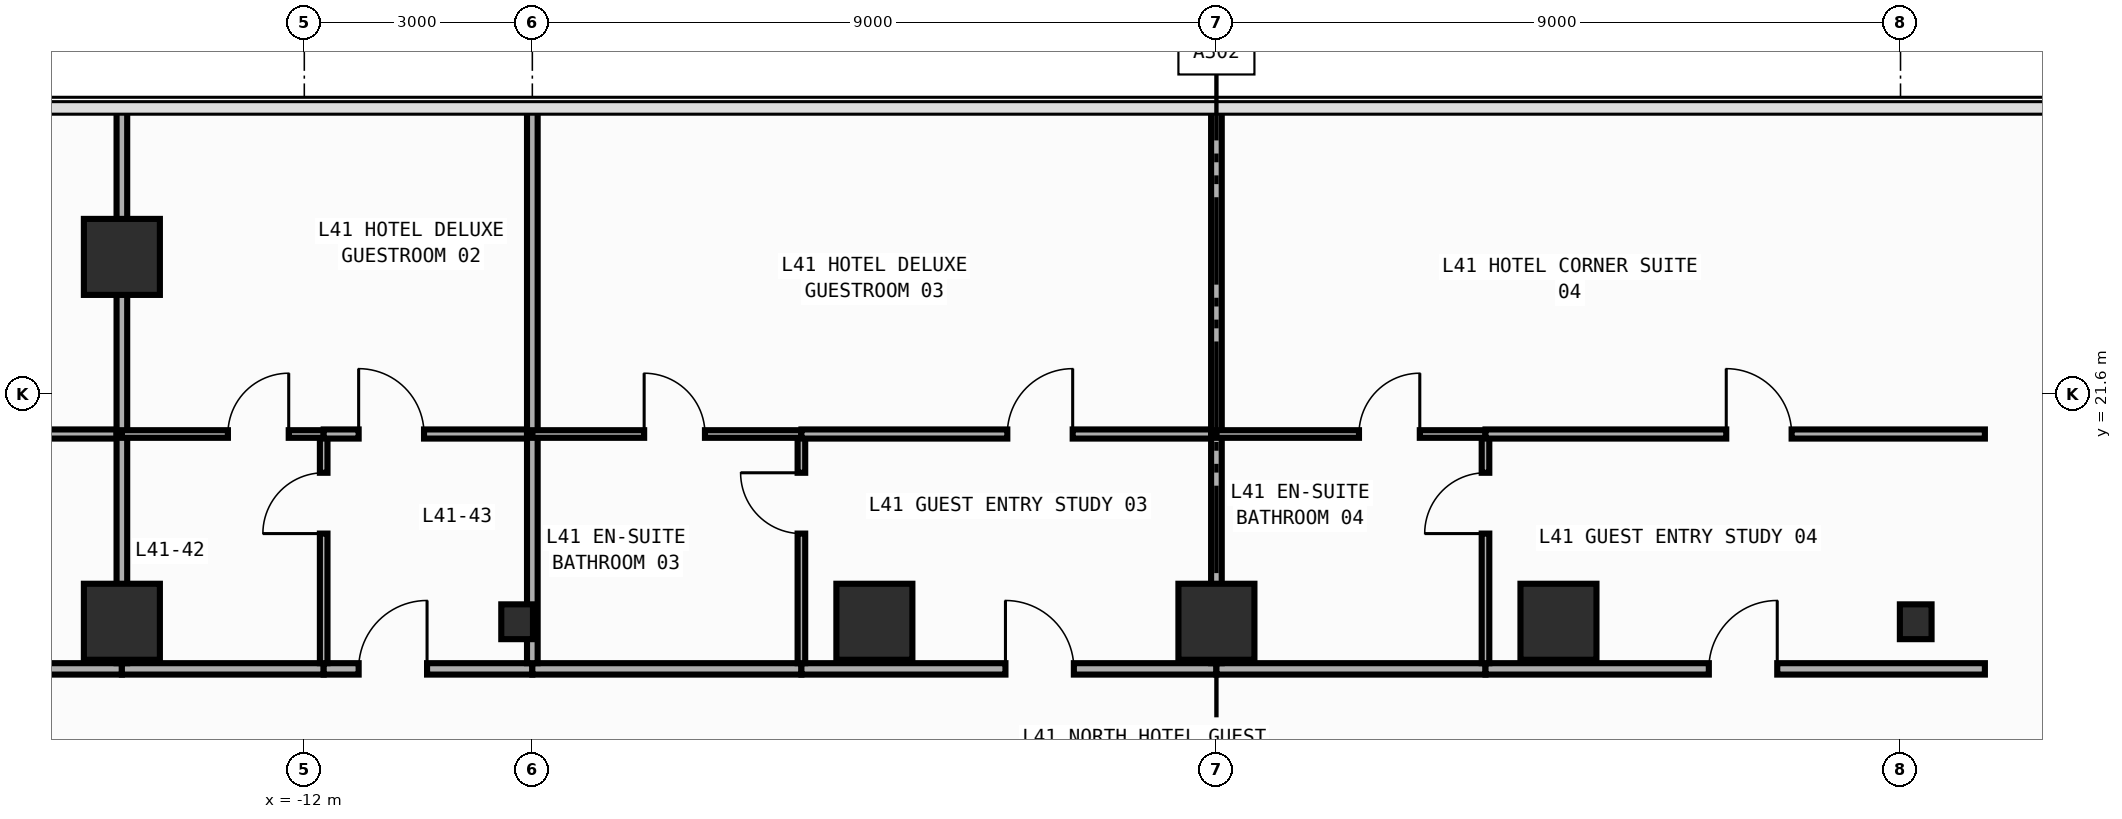
"""IFC4 building model, lengths in metres.
Left out: names, types, materials, properties, quantities, classifications, styles, units other than length and angle.
Written with IfcOpenShell. Run it as: python <this file> out.ifc"""

import sys

from ifc_helpers import new_model, si_unit, direction, frame, frame_2d, origin, origin_2d, place, context, subcontext, project, spatial, rectangle, i_section, extrude, element, fill, save


model = new_model("IFC4")
c1 = context("Model", 3, precision=1e-05, world=origin(), true_north=direction((0.0, 1.0)))
c2 = subcontext(c1, "Body", "Model", "MODEL_VIEW")
j1 = project(units=[si_unit("LENGTHUNIT", "METRE"), si_unit("PLANEANGLEUNIT", "RADIAN")], contexts=[c1])
p1 = place(None, origin())
s1 = spatial("IfcSite", under=j1, at=p1, CompositionType="ELEMENT")
p2 = place(p1, origin())
s2 = spatial("IfcBuilding", under=s1, at=p2, CompositionType="ELEMENT")
p3 = place(p2, frame((0.0, 0.0, 180.2)))
s3 = spatial("IfcBuildingStorey", under=s2, at=p3, CompositionType="ELEMENT", Elevation=180.2)
for number, where, z_axis, x_axis in (
    (1, (-9.2, 18.6, 0.0), (0.0, 0.0, 1.0), (1.0, 0.0, 0.0)),
    (2, (9.2, 18.6, 0.0), (0.0, 0.0, 1.0), (1.0, 0.0, 0.0)),
):
    element("IfcColumn", number, at=place(p3, frame(where, z_axis=z_axis, x_axis=x_axis)), inside=s3, PredefinedType="COLUMN", context=c2, shape_type="SweptSolid", body=[
        extrude(i_section(OverallWidth=0.417, OverallDepth=0.458, WebThickness=0.03, FlangeThickness=0.05, FilletRadius=0.022, at=origin_2d()), origin(), (0.0, 0.0, 1.0), 3.8),
    ])
for number, where, z_axis, x_axis in (
    (3, (-14.4, 18.6, 0.0), (0.0, 0.0, 1.0), (1.0, 0.0, 0.0)),
    (4, (-4.5, 18.6, 0.0), (0.0, 0.0, 1.0), (1.0, 0.0, 0.0)),
    (5, (0.0, 18.6, 0.0), (0.0, 0.0, 1.0), (1.0, 0.0, 0.0)),
    (6, (4.5, 18.6, 0.0), (0.0, 0.0, 1.0), (1.0, 0.0, 0.0)),
    (7, (-14.4, 23.4, 0.0), (0.0, 0.0, 1.0), (1.0, 0.0, 0.0)),
):
    element("IfcColumn", number, at=place(p3, frame(where, z_axis=z_axis, x_axis=x_axis)), inside=s3, PredefinedType="COLUMN", context=c2, shape_type="SweptSolid", body=[
        extrude(rectangle(XDim=1.0, YDim=1.0, at=origin_2d()), origin(), (0.0, 0.0, 1.0), 3.8),
    ])
p4 = place(p3, frame((-18.764, 17.98, 0.0), z_axis=(0.0, 0.0, 1.0), x_axis=(1.0, 0.0, 0.0)))
e8 = element("IfcWall", 8, at=p4, inside=s3, PredefinedType="PARTITIONING", context=c2, shape_type="SweptSolid", body=[
    extrude(rectangle(XDim=4.364, YDim=0.15, at=frame_2d((2.182, 0.0))), origin(), (0.0, 0.0, 1.0), 3.54),
])
p5 = place(p4, frame((0.884, 0.0, 0.0)))
e9 = element("IfcOpeningElement", 9, at=p5, cuts=e8, PredefinedType="OPENING", context=c2, shape_type="SweptSolid", body=[
    extrude(rectangle(XDim=0.9, YDim=2.15, at=frame_2d((0.45, 1.075))), frame((0.0, 0.085, 0.0), z_axis=(0.0, -1.0, 0.0), x_axis=(1.0, 0.0, 0.0)), (0.0, 0.0, 1.0), 0.17),
])
p6 = place(p3, frame((-14.4, 17.98, 0.0), z_axis=(0.0, 0.0, 1.0), x_axis=(1.0, 0.0, 0.0)))
e10 = element("IfcWall", 10, at=p6, inside=s3, PredefinedType="PARTITIONING", context=c2, shape_type="SweptSolid", body=[
    extrude(rectangle(XDim=2.655, YDim=0.15, at=frame_2d((1.327, 0.0))), origin(), (0.0, 0.0, 1.0), 3.54),
])
p7 = place(p3, frame((-11.745, 17.98, 0.0), z_axis=(0.0, 0.0, 1.0), x_axis=(1.0, 0.0, 0.0)))
e11 = element("IfcWall", 11, at=p7, inside=s3, PredefinedType="PARTITIONING", context=c2, shape_type="SweptSolid", body=[
    extrude(rectangle(XDim=2.745, YDim=0.15, at=frame_2d((1.373, 0.0))), origin(), (0.0, 0.0, 1.0), 3.54),
])
p8 = place(p7, frame((0.46, 0.0, 0.0)))
e12 = element("IfcOpeningElement", 12, at=p8, cuts=e11, PredefinedType="OPENING", context=c2, shape_type="SweptSolid", body=[
    extrude(rectangle(XDim=0.9, YDim=2.15, at=frame_2d((0.45, 1.075))), frame((0.0, 0.085, 0.0), z_axis=(0.0, -1.0, 0.0), x_axis=(1.0, 0.0, 0.0)), (0.0, 0.0, 1.0), 0.17),
])
p9 = place(p3, frame((-9.0, 17.98, 0.0), z_axis=(0.0, 0.0, 1.0), x_axis=(1.0, 0.0, 0.0)))
e13 = element("IfcWall", 13, at=p9, inside=s3, PredefinedType="PARTITIONING", context=c2, shape_type="SweptSolid", body=[
    extrude(rectangle(XDim=3.54, YDim=0.15, at=frame_2d((1.77, 0.0))), origin(), (0.0, 0.0, 1.0), 3.54),
])
p10 = place(p3, frame((-5.46, 17.98, 0.0), z_axis=(0.0, 0.0, 1.0), x_axis=(1.0, 0.0, 0.0)))
e14 = element("IfcWall", 14, at=p10, inside=s3, PredefinedType="PARTITIONING", context=c2, shape_type="SweptSolid", body=[
    extrude(rectangle(XDim=5.46, YDim=0.15, at=frame_2d((2.73, 0.0))), origin(), (0.0, 0.0, 1.0), 3.54),
])
p11 = place(p10, frame((2.684, 0.0, 0.0)))
e15 = element("IfcOpeningElement", 15, at=p11, cuts=e14, PredefinedType="OPENING", context=c2, shape_type="SweptSolid", body=[
    extrude(rectangle(XDim=0.9, YDim=2.15, at=frame_2d((0.45, 1.075))), frame((0.0, 0.085, 0.0), z_axis=(0.0, -1.0, 0.0), x_axis=(1.0, 0.0, 0.0)), (0.0, 0.0, 1.0), 0.17),
])
p12 = place(p3, frame((0.0, 17.98, 0.0), z_axis=(0.0, 0.0, 1.0), x_axis=(1.0, 0.0, 0.0)))
e16 = element("IfcWall", 16, at=p12, inside=s3, PredefinedType="PARTITIONING", context=c2, shape_type="SweptSolid", body=[
    extrude(rectangle(XDim=3.54, YDim=0.15, at=frame_2d((1.77, 0.0))), origin(), (0.0, 0.0, 1.0), 3.54),
])
p13 = place(p3, frame((3.54, 17.98, 0.0), z_axis=(0.0, 0.0, 1.0), x_axis=(1.0, 0.0, 0.0)))
e17 = element("IfcWall", 17, at=p13, inside=s3, PredefinedType="PARTITIONING", context=c2, shape_type="SweptSolid", body=[
    extrude(rectangle(XDim=6.57, YDim=0.15, at=frame_2d((3.285, 0.0))), origin(), (0.0, 0.0, 1.0), 3.54),
])
p14 = place(p13, frame((2.938, 0.0, 0.0)))
e18 = element("IfcOpeningElement", 18, at=p14, cuts=e17, PredefinedType="OPENING", context=c2, shape_type="SweptSolid", body=[
    extrude(rectangle(XDim=0.9, YDim=2.15, at=frame_2d((0.45, 1.075))), frame((0.0, 0.085, 0.0), z_axis=(0.0, -1.0, 0.0), x_axis=(1.0, 0.0, 0.0)), (0.0, 0.0, 1.0), 0.17),
])
p15 = place(p3, frame((-18.764, 21.07, 0.0), z_axis=(0.0, 0.0, 1.0), x_axis=(1.0, 0.0, 0.0)))
e19 = element("IfcWall", 19, at=p15, inside=s3, PredefinedType="PARTITIONING", context=c2, shape_type="SweptSolid", body=[
    extrude(rectangle(XDim=4.364, YDim=0.12, at=frame_2d((2.182, 0.0))), origin(), (0.0, 0.0, 1.0), 3.54),
])
p16 = place(p15, frame((0.891, 0.0, 0.0)))
e20 = element("IfcOpeningElement", 20, at=p16, cuts=e19, PredefinedType="OPENING", context=c2, shape_type="SweptSolid", body=[
    extrude(rectangle(XDim=0.86, YDim=2.15, at=frame_2d((0.43, 1.075))), frame((0.0, 0.07, 0.0), z_axis=(0.0, -1.0, 0.0), x_axis=(1.0, 0.0, 0.0)), (0.0, 0.0, 1.0), 0.14),
])
p17 = place(p3, frame((-14.4, 18.055, 0.0), z_axis=(0.0, 0.0, 1.0), x_axis=(0.0, 1.0, 0.0)))
e21 = element("IfcWall", 21, at=p17, inside=s3, PredefinedType="PARTITIONING", context=c2, shape_type="SweptSolid", body=[
    extrude(rectangle(XDim=3.015, YDim=0.14, at=frame_2d((1.508, 0.0))), origin(), (0.0, 0.0, 1.0), 2.952),
])
p18 = place(p3, frame((-14.4, 21.07, 0.0), z_axis=(0.0, 0.0, 1.0), x_axis=(0.0, 1.0, 0.0)))
e22 = element("IfcWall", 22, at=p18, inside=s3, PredefinedType="PARTITIONING", context=c2, shape_type="SweptSolid", body=[
    extrude(rectangle(XDim=4.285, YDim=0.14, at=frame_2d((2.143, 0.0))), origin(), (0.0, 0.0, 1.0), 2.952),
])
p19 = place(p3, frame((-11.745, 18.055, 0.0), z_axis=(0.0, 0.0, 1.0), x_axis=(0.0, 1.0, 0.0)))
e23 = element("IfcWall", 23, at=p19, inside=s3, PredefinedType="PARTITIONING", context=c2, shape_type="SweptSolid", body=[
    extrude(rectangle(XDim=2.965, YDim=0.1, at=frame_2d((1.482, 0.0))), origin(), (0.0, 0.0, 1.0), 3.54),
])
p20 = place(p19, frame((1.705, 0.0, 0.0)))
e24 = element("IfcOpeningElement", 24, at=p20, cuts=e23, PredefinedType="OPENING", context=c2, shape_type="SweptSolid", body=[
    extrude(rectangle(XDim=0.8, YDim=2.1, at=frame_2d((0.4, 1.05))), frame((0.0, 0.06, 0.0), z_axis=(0.0, -1.0, 0.0), x_axis=(1.0, 0.0, 0.0)), (0.0, 0.0, 1.0), 0.12),
])
p21 = place(p3, frame((-14.4, 21.07, 0.0), z_axis=(0.0, 0.0, 1.0), x_axis=(1.0, 0.0, 0.0)))
e25 = element("IfcWall", 25, at=p21, inside=s3, PredefinedType="PARTITIONING", context=c2, shape_type="SweptSolid", body=[
    extrude(rectangle(XDim=2.655, YDim=0.1, at=frame_2d((1.327, 0.0))), origin(), (0.0, 0.0, 1.0), 3.54),
])
p22 = place(p21, frame((1.395, 0.0, 0.0)))
e26 = element("IfcOpeningElement", 26, at=p22, cuts=e25, PredefinedType="OPENING", context=c2, shape_type="SweptSolid", body=[
    extrude(rectangle(XDim=0.8, YDim=2.1, at=frame_2d((0.4, 1.05))), frame((0.0, 0.06, 0.0), z_axis=(0.0, -1.0, 0.0), x_axis=(1.0, 0.0, 0.0)), (0.0, 0.0, 1.0), 0.12),
])
p23 = place(p3, frame((-11.745, 21.07, 0.0), z_axis=(0.0, 0.0, 1.0), x_axis=(1.0, 0.0, 0.0)))
e27 = element("IfcWall", 27, at=p23, inside=s3, PredefinedType="PARTITIONING", context=c2, shape_type="SweptSolid", body=[
    extrude(rectangle(XDim=2.745, YDim=0.12, at=frame_2d((1.373, 0.0))), origin(), (0.0, 0.0, 1.0), 3.54),
])
p24 = place(p23, frame((0.46, 0.0, 0.0)))
e28 = element("IfcOpeningElement", 28, at=p24, cuts=e27, PredefinedType="OPENING", context=c2, shape_type="SweptSolid", body=[
    extrude(rectangle(XDim=0.86, YDim=2.15, at=frame_2d((0.43, 1.075))), frame((0.0, 0.07, 0.0), z_axis=(0.0, -1.0, 0.0), x_axis=(1.0, 0.0, 0.0)), (0.0, 0.0, 1.0), 0.14),
])
p25 = place(p3, frame((-9.0, 18.055, 0.0), z_axis=(0.0, 0.0, 1.0), x_axis=(0.0, 1.0, 0.0)))
e29 = element("IfcWall", 29, at=p25, inside=s3, PredefinedType="PARTITIONING", context=c2, shape_type="SweptSolid", body=[
    extrude(rectangle(XDim=3.015, YDim=0.14, at=frame_2d((1.508, 0.0))), origin(), (0.0, 0.0, 1.0), 2.952),
])
p26 = place(p3, frame((-9.0, 21.07, 0.0), z_axis=(0.0, 0.0, 1.0), x_axis=(0.0, 1.0, 0.0)))
e30 = element("IfcWall", 30, at=p26, inside=s3, PredefinedType="PARTITIONING", context=c2, shape_type="SweptSolid", body=[
    extrude(rectangle(XDim=4.285, YDim=0.14, at=frame_2d((2.143, 0.0))), origin(), (0.0, 0.0, 1.0), 3.54),
])
p27 = place(p3, frame((-5.46, 18.055, 0.0), z_axis=(0.0, 0.0, 1.0), x_axis=(0.0, 1.0, 0.0)))
e31 = element("IfcWall", 31, at=p27, inside=s3, PredefinedType="PARTITIONING", context=c2, shape_type="SweptSolid", body=[
    extrude(rectangle(XDim=2.965, YDim=0.1, at=frame_2d((1.482, 0.0))), origin(), (0.0, 0.0, 1.0), 3.54),
])
p28 = place(p27, frame((1.705, 0.0, 0.0)))
e32 = element("IfcOpeningElement", 32, at=p28, cuts=e31, PredefinedType="OPENING", context=c2, shape_type="SweptSolid", body=[
    extrude(rectangle(XDim=0.8, YDim=2.1, at=frame_2d((0.4, 1.05))), frame((0.0, 0.06, 0.0), z_axis=(0.0, -1.0, 0.0), x_axis=(1.0, 0.0, 0.0)), (0.0, 0.0, 1.0), 0.12),
])
p29 = place(p3, frame((-9.0, 21.07, 0.0), z_axis=(0.0, 0.0, 1.0), x_axis=(1.0, 0.0, 0.0)))
e33 = element("IfcWall", 33, at=p29, inside=s3, PredefinedType="PARTITIONING", context=c2, shape_type="SweptSolid", body=[
    extrude(rectangle(XDim=3.54, YDim=0.1, at=frame_2d((1.77, 0.0))), origin(), (0.0, 0.0, 1.0), 3.54),
])
p30 = place(p29, frame((1.471, 0.0, 0.0)))
e34 = element("IfcOpeningElement", 34, at=p30, cuts=e33, PredefinedType="OPENING", context=c2, shape_type="SweptSolid", body=[
    extrude(rectangle(XDim=0.8, YDim=2.1, at=frame_2d((0.4, 1.05))), frame((0.0, 0.06, 0.0), z_axis=(0.0, -1.0, 0.0), x_axis=(1.0, 0.0, 0.0)), (0.0, 0.0, 1.0), 0.12),
])
p31 = place(p3, frame((-5.46, 21.07, 0.0), z_axis=(0.0, 0.0, 1.0), x_axis=(1.0, 0.0, 0.0)))
e35 = element("IfcWall", 35, at=p31, inside=s3, PredefinedType="PARTITIONING", context=c2, shape_type="SweptSolid", body=[
    extrude(rectangle(XDim=5.46, YDim=0.12, at=frame_2d((2.73, 0.0))), origin(), (0.0, 0.0, 1.0), 3.54),
])
p32 = place(p31, frame((2.709, 0.0, 0.0)))
e36 = element("IfcOpeningElement", 36, at=p32, cuts=e35, PredefinedType="OPENING", context=c2, shape_type="SweptSolid", body=[
    extrude(rectangle(XDim=0.86, YDim=2.15, at=frame_2d((0.43, 1.075))), frame((0.0, 0.07, 0.0), z_axis=(0.0, -1.0, 0.0), x_axis=(1.0, 0.0, 0.0)), (0.0, 0.0, 1.0), 0.14),
])
p33 = place(p3, frame((0.0, 18.055, 0.0), z_axis=(0.0, 0.0, 1.0), x_axis=(0.0, 1.0, 0.0)))
e37 = element("IfcWall", 37, at=p33, inside=s3, PredefinedType="PARTITIONING", context=c2, shape_type="SweptSolid", body=[
    extrude(rectangle(XDim=3.015, YDim=0.14, at=frame_2d((1.508, 0.0))), origin(), (0.0, 0.0, 1.0), 3.54),
])
p34 = place(p3, frame((0.0, 21.07, 0.0), z_axis=(0.0, 0.0, 1.0), x_axis=(0.0, 1.0, 0.0)))
e38 = element("IfcWall", 38, at=p34, inside=s3, PredefinedType="PARTITIONING", context=c2, shape_type="SweptSolid", body=[
    extrude(rectangle(XDim=4.285, YDim=0.14, at=frame_2d((2.143, 0.0))), origin(), (0.0, 0.0, 1.0), 3.54),
])
p35 = place(p3, frame((3.54, 18.055, 0.0), z_axis=(0.0, 0.0, 1.0), x_axis=(0.0, 1.0, 0.0)))
e39 = element("IfcWall", 39, at=p35, inside=s3, PredefinedType="PARTITIONING", context=c2, shape_type="SweptSolid", body=[
    extrude(rectangle(XDim=2.965, YDim=0.1, at=frame_2d((1.482, 0.0))), origin(), (0.0, 0.0, 1.0), 3.54),
])
p36 = place(p35, frame((1.705, 0.0, 0.0)))
e40 = element("IfcOpeningElement", 40, at=p36, cuts=e39, PredefinedType="OPENING", context=c2, shape_type="SweptSolid", body=[
    extrude(rectangle(XDim=0.8, YDim=2.1, at=frame_2d((0.4, 1.05))), frame((0.0, 0.06, 0.0), z_axis=(0.0, -1.0, 0.0), x_axis=(1.0, 0.0, 0.0)), (0.0, 0.0, 1.0), 0.12),
])
p37 = place(p3, frame((0.0, 21.07, 0.0), z_axis=(0.0, 0.0, 1.0), x_axis=(1.0, 0.0, 0.0)))
e41 = element("IfcWall", 41, at=p37, inside=s3, PredefinedType="PARTITIONING", context=c2, shape_type="SweptSolid", body=[
    extrude(rectangle(XDim=3.54, YDim=0.1, at=frame_2d((1.77, 0.0))), origin(), (0.0, 0.0, 1.0), 3.54),
])
p38 = place(p37, frame((1.875, 0.0, 0.0)))
e42 = element("IfcOpeningElement", 42, at=p38, cuts=e41, PredefinedType="OPENING", context=c2, shape_type="SweptSolid", body=[
    extrude(rectangle(XDim=0.8, YDim=2.1, at=frame_2d((0.4, 1.05))), frame((0.0, 0.06, 0.0), z_axis=(0.0, -1.0, 0.0), x_axis=(1.0, 0.0, 0.0)), (0.0, 0.0, 1.0), 0.12),
])
p39 = place(p3, frame((3.54, 21.07, 0.0), z_axis=(0.0, 0.0, 1.0), x_axis=(1.0, 0.0, 0.0)))
e43 = element("IfcWall", 43, at=p39, inside=s3, PredefinedType="PARTITIONING", context=c2, shape_type="SweptSolid", body=[
    extrude(rectangle(XDim=6.57, YDim=0.12, at=frame_2d((3.285, 0.0))), origin(), (0.0, 0.0, 1.0), 3.54),
])
p40 = place(p39, frame((3.167, 0.0, 0.0)))
e44 = element("IfcOpeningElement", 44, at=p40, cuts=e43, PredefinedType="OPENING", context=c2, shape_type="SweptSolid", body=[
    extrude(rectangle(XDim=0.86, YDim=2.15, at=frame_2d((0.43, 1.075))), frame((0.0, 0.07, 0.0), z_axis=(0.0, -1.0, 0.0), x_axis=(1.0, 0.0, 0.0)), (0.0, 0.0, 1.0), 0.14),
])
p41 = place(p8, origin())
e45 = element("IfcDoor", 45, at=p41, inside=s3, OperationType="SINGLE_SWING_RIGHT", PredefinedType="DOOR", context=c2, shape_type="SweptSolid", body=[
    extrude(rectangle(XDim=0.9, YDim=2.15, at=frame_2d((0.45, 1.075))), frame((0.0, 0.025, 0.0), z_axis=(0.0, -1.0, 0.0), x_axis=(1.0, 0.0, 0.0)), (0.0, 0.0, 1.0), 0.05),
])
fill(e12, e45)
p42 = place(p11, origin())
e46 = element("IfcDoor", 46, at=p42, inside=s3, OperationType="SINGLE_SWING_LEFT", PredefinedType="DOOR", context=c2, shape_type="SweptSolid", body=[
    extrude(rectangle(XDim=0.9, YDim=2.15, at=frame_2d((0.45, 1.075))), frame((0.0, 0.025, 0.0), z_axis=(0.0, -1.0, 0.0), x_axis=(1.0, 0.0, 0.0)), (0.0, 0.0, 1.0), 0.05),
])
fill(e15, e46)
p43 = place(p14, origin())
e47 = element("IfcDoor", 47, at=p43, inside=s3, OperationType="SINGLE_SWING_RIGHT", PredefinedType="DOOR", context=c2, shape_type="SweptSolid", body=[
    extrude(rectangle(XDim=0.9, YDim=2.15, at=frame_2d((0.45, 1.075))), frame((0.0, 0.025, 0.0), z_axis=(0.0, -1.0, 0.0), x_axis=(1.0, 0.0, 0.0)), (0.0, 0.0, 1.0), 0.05),
])
fill(e18, e47)
p44 = place(p20, origin())
e48 = element("IfcDoor", 48, at=p44, inside=s3, OperationType="SINGLE_SWING_LEFT", PredefinedType="DOOR", context=c2, shape_type="SweptSolid", body=[
    extrude(rectangle(XDim=0.8, YDim=2.1, at=frame_2d((0.4, 1.05))), frame((0.0, 0.025, 0.0), z_axis=(0.0, -1.0, 0.0), x_axis=(1.0, 0.0, 0.0)), (0.0, 0.0, 1.0), 0.05),
])
fill(e24, e48)
p45 = place(p22, origin())
e49 = element("IfcDoor", 49, at=p45, inside=s3, OperationType="SINGLE_SWING_RIGHT", PredefinedType="DOOR", context=c2, shape_type="SweptSolid", body=[
    extrude(rectangle(XDim=0.8, YDim=2.1, at=frame_2d((0.4, 1.05))), frame((0.0, 0.025, 0.0), z_axis=(0.0, -1.0, 0.0), x_axis=(1.0, 0.0, 0.0)), (0.0, 0.0, 1.0), 0.05),
])
fill(e26, e49)
p46 = place(p24, origin())
e50 = element("IfcDoor", 50, at=p46, inside=s3, OperationType="SINGLE_SWING_LEFT", PredefinedType="DOOR", context=c2, shape_type="SweptSolid", body=[
    extrude(rectangle(XDim=0.86, YDim=2.15, at=frame_2d((0.43, 1.075))), frame((0.0, 0.025, 0.0), z_axis=(0.0, -1.0, 0.0), x_axis=(1.0, 0.0, 0.0)), (0.0, 0.0, 1.0), 0.05),
])
fill(e28, e50)
p47 = place(p28, origin())
e51 = element("IfcDoor", 51, at=p47, inside=s3, OperationType="SINGLE_SWING_RIGHT", PredefinedType="DOOR", context=c2, shape_type="SweptSolid", body=[
    extrude(rectangle(XDim=0.8, YDim=2.1, at=frame_2d((0.4, 1.05))), frame((0.0, 0.025, 0.0), z_axis=(0.0, -1.0, 0.0), x_axis=(1.0, 0.0, 0.0)), (0.0, 0.0, 1.0), 0.05),
])
fill(e32, e51)
p48 = place(p30, origin())
e52 = element("IfcDoor", 52, at=p48, inside=s3, OperationType="SINGLE_SWING_LEFT", PredefinedType="DOOR", context=c2, shape_type="SweptSolid", body=[
    extrude(rectangle(XDim=0.8, YDim=2.1, at=frame_2d((0.4, 1.05))), frame((0.0, 0.025, 0.0), z_axis=(0.0, -1.0, 0.0), x_axis=(1.0, 0.0, 0.0)), (0.0, 0.0, 1.0), 0.05),
])
fill(e34, e52)
p49 = place(p32, origin())
e53 = element("IfcDoor", 53, at=p49, inside=s3, OperationType="SINGLE_SWING_RIGHT", PredefinedType="DOOR", context=c2, shape_type="SweptSolid", body=[
    extrude(rectangle(XDim=0.86, YDim=2.15, at=frame_2d((0.43, 1.075))), frame((0.0, 0.025, 0.0), z_axis=(0.0, -1.0, 0.0), x_axis=(1.0, 0.0, 0.0)), (0.0, 0.0, 1.0), 0.05),
])
fill(e36, e53)
p50 = place(p36, origin())
e54 = element("IfcDoor", 54, at=p50, inside=s3, OperationType="SINGLE_SWING_LEFT", PredefinedType="DOOR", context=c2, shape_type="SweptSolid", body=[
    extrude(rectangle(XDim=0.8, YDim=2.1, at=frame_2d((0.4, 1.05))), frame((0.0, 0.025, 0.0), z_axis=(0.0, -1.0, 0.0), x_axis=(1.0, 0.0, 0.0)), (0.0, 0.0, 1.0), 0.05),
])
fill(e40, e54)
p51 = place(p38, origin())
e55 = element("IfcDoor", 55, at=p51, inside=s3, OperationType="SINGLE_SWING_RIGHT", PredefinedType="DOOR", context=c2, shape_type="SweptSolid", body=[
    extrude(rectangle(XDim=0.8, YDim=2.1, at=frame_2d((0.4, 1.05))), frame((0.0, 0.025, 0.0), z_axis=(0.0, -1.0, 0.0), x_axis=(1.0, 0.0, 0.0)), (0.0, 0.0, 1.0), 0.05),
])
fill(e42, e55)
p52 = place(p40, origin())
e56 = element("IfcDoor", 56, at=p52, inside=s3, OperationType="SINGLE_SWING_LEFT", PredefinedType="DOOR", context=c2, shape_type="SweptSolid", body=[
    extrude(rectangle(XDim=0.86, YDim=2.15, at=frame_2d((0.43, 1.075))), frame((0.0, 0.025, 0.0), z_axis=(0.0, -1.0, 0.0), x_axis=(1.0, 0.0, 0.0)), (0.0, 0.0, 1.0), 0.05),
])
fill(e44, e56)
save(model, sys.argv[1])
